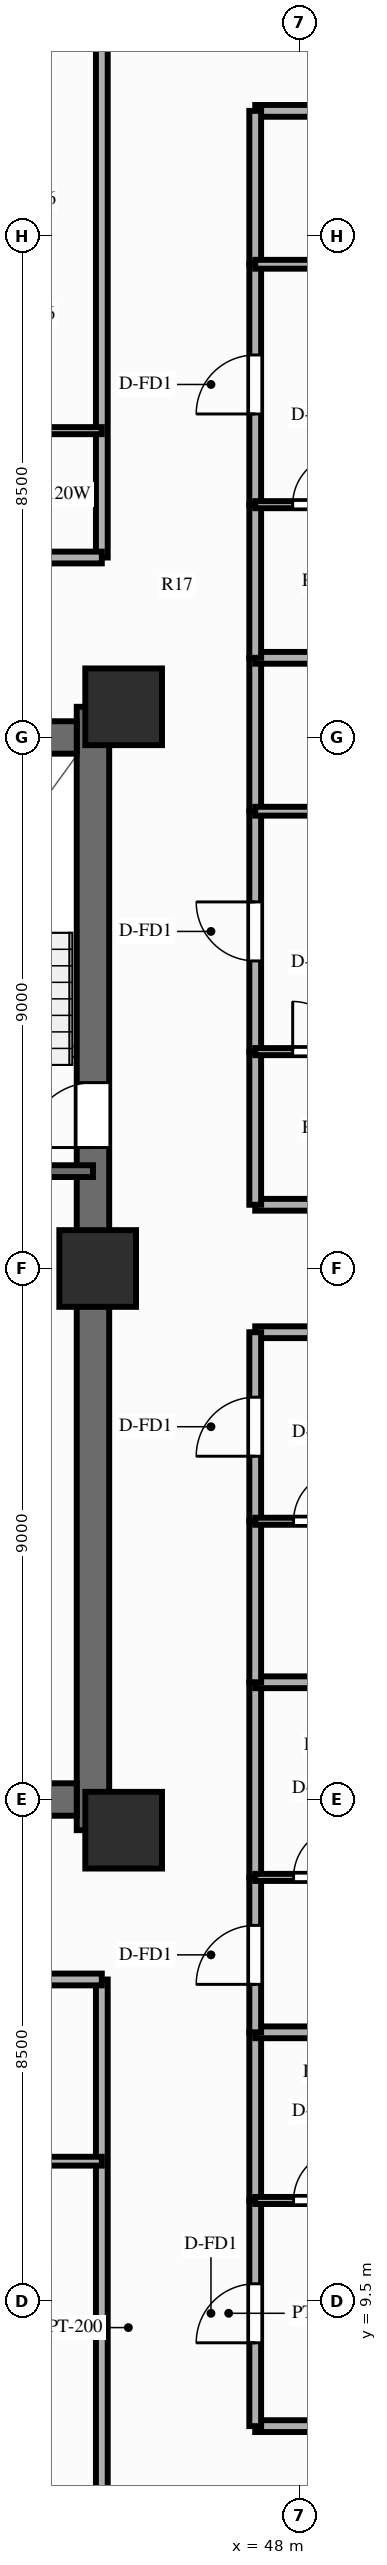
"""IFC4 building model, lengths in metres.
Left out: names, types, materials, properties, quantities, classifications, styles, units other than length and angle.
Written with IfcOpenShell. Run it as: python <this file> out.ifc"""

import sys

from ifc_helpers import new_model, si_unit, direction, frame, frame_2d, origin, origin_2d, place, context, subcontext, project, spatial, rectangle, extrude, source, transform, mapped, element, fill, save


model = new_model("IFC4")
c1 = context("Model", 3, precision=1e-05, world=origin(), true_north=direction((0.0, 1.0)))
c2 = subcontext(c1, "Body", "Model", "MODEL_VIEW")
j1 = project(units=[si_unit("LENGTHUNIT", "METRE"), si_unit("PLANEANGLEUNIT", "RADIAN")], contexts=[c1])
p1 = place(None, origin())
s1 = spatial("IfcSite", under=j1, at=p1, CompositionType="ELEMENT")
p2 = place(p1, origin())
s2 = spatial("IfcBuilding", under=s1, at=p2, CompositionType="ELEMENT")
p3 = place(p2, frame((0.0, 0.0, 119.85)))
s3 = spatial("IfcBuildingStorey", under=s2, at=p3, CompositionType="ELEMENT", Elevation=119.85)
p4 = place(p3, frame((44.5, 17.48, 0.0), z_axis=(0.0, 0.0, 1.0), x_axis=(0.0, 1.0, 0.0)))
e1 = element("IfcWall", 1, at=p4, inside=s3, PredefinedType="SHEAR", context=c2, shape_type="SweptSolid", body=[
    extrude(rectangle(XDim=19.04, YDim=0.55, at=frame_2d((9.52, 0.0))), origin(), (0.0, 0.0, 1.0), 3.0),
])
p5 = place(p4, frame((12.67, 0.0, 0.0), z_axis=(0.0, 0.0, 1.0), x_axis=(-1.0, 0.0, 0.0)))
e2 = element("IfcOpeningElement", 2, at=p5, cuts=e1, PredefinedType="OPENING", context=c2, shape_type="SweptSolid", body=[
    extrude(rectangle(XDim=1.1, YDim=2.15, at=frame_2d((0.55, 1.075))), frame((0.0, 0.287, 0.0), z_axis=(0.0, -1.0, 0.0), x_axis=(1.0, 0.0, 0.0)), (0.0, 0.0, 1.0), 0.574),
])
p6 = place(p3, frame((31.775, 18.0, 0.0), z_axis=(0.0, 0.0, 1.0), x_axis=(1.0, 0.0, 0.0)))
e3 = element("IfcWall", 3, at=p6, inside=s3, PredefinedType="SHEAR", context=c2, shape_type="SweptSolid", body=[
    extrude(rectangle(XDim=12.45, YDim=0.55, at=frame_2d((6.225, 0.0))), origin(), (0.0, 0.0, 1.0), 3.0),
])
p7 = place(p3, frame((31.775, 36.0, 0.0), z_axis=(0.0, 0.0, 1.0), x_axis=(1.0, 0.0, 0.0)))
e4 = element("IfcWall", 4, at=p7, inside=s3, PredefinedType="SHEAR", context=c2, shape_type="SweptSolid", body=[
    extrude(rectangle(XDim=12.45, YDim=0.55, at=frame_2d((6.225, 0.0))), origin(), (0.0, 0.0, 1.0), 3.0),
])
p8 = place(p7, frame((5.175, 0.0, 0.0), z_axis=(0.0, 0.0, 1.0), x_axis=(-1.0, 0.0, 0.0)))
e5 = element("IfcOpeningElement", 5, at=p8, cuts=e4, PredefinedType="OPENING", context=c2, shape_type="SweptSolid", body=[
    extrude(rectangle(XDim=1.4, YDim=2.15, at=frame_2d((0.7, 1.075))), frame((0.0, 0.287, 0.0), z_axis=(0.0, -1.0, 0.0), x_axis=(1.0, 0.0, 0.0)), (0.0, 0.0, 1.0), 0.574),
])
m1 = source(origin(), c2, "Body", "SweptSolid", [
    extrude(rectangle(XDim=1.3, YDim=1.3, at=origin_2d()), origin(), (0.0, 0.0, 1.0), 3.0),
])
for number, where, z_axis, x_axis in (
    (6, (45.02, 17.48, 0.0), (0.0, 0.0, 1.0), (1.0, 0.0, 0.0)),
    (7, (45.02, 36.52, 0.0), (0.0, 0.0, 1.0), (1.0, 0.0, 0.0)),
    (8, (44.58, 27.0, 0.0), (0.0, 0.0, 1.0), (1.0, 0.0, 0.0)),
):
    element("IfcColumn", number, at=place(p3, frame(where, z_axis=z_axis, x_axis=x_axis)), inside=s3, PredefinedType="COLUMN", context=c2, shape_type="MappedRepresentation", body=[
        mapped(m1, transform((0.0, 0.0, 0.0), scale=1.0)),
    ])
p9 = place(p3, frame((40.57, 28.65, 0.0), z_axis=(0.0, 0.0, 1.0), x_axis=(1.0, 0.0, 0.0)))
e9 = element("IfcWall", 9, at=p9, inside=s3, PredefinedType="SOLIDWALL", context=c2, shape_type="SweptSolid", body=[
    extrude(rectangle(XDim=3.93, YDim=0.2, at=frame_2d((1.965, 0.0))), origin(), (0.0, 0.0, 1.0), 2.79),
])
p10 = place(p3, frame((44.65, 14.95, 0.0), z_axis=(0.0, 0.0, 1.0), x_axis=(0.0, -1.0, 0.0)))
e10 = element("IfcWall", 10, at=p10, inside=s3, PredefinedType="PARTITIONING", context=c2, shape_type="SweptSolid", body=[
    extrude(rectangle(XDim=11.8, YDim=0.2, at=frame_2d((5.9, 0.0))), origin(), (0.0, 0.0, 1.0), 2.34),
])
p11 = place(p3, frame((40.923, 14.95, 0.0), z_axis=(0.0, 0.0, 1.0), x_axis=(1.0, 0.0, 0.0)))
e11 = element("IfcWall", 11, at=p11, inside=s3, PredefinedType="PARTITIONING", context=c2, shape_type="SweptSolid", body=[
    extrude(rectangle(XDim=3.727, YDim=0.2, at=frame_2d((1.864, 0.0))), origin(), (0.0, 0.0, 1.0), 2.79),
])
p12 = place(p3, frame((40.923, 11.87, 0.0), z_axis=(0.0, 0.0, 1.0), x_axis=(1.0, 0.0, 0.0)))
e12 = element("IfcWall", 12, at=p12, inside=s3, PredefinedType="PARTITIONING", context=c2, shape_type="SweptSolid", body=[
    extrude(rectangle(XDim=3.727, YDim=0.15, at=frame_2d((1.864, 0.0))), origin(), (0.0, 0.0, 1.0), 2.79),
])
p13 = place(p3, frame((44.65, 39.05, 0.0), z_axis=(0.0, 0.0, 1.0), x_axis=(0.0, 1.0, 0.0)))
e13 = element("IfcWall", 13, at=p13, inside=s3, PredefinedType="PARTITIONING", context=c2, shape_type="SweptSolid", body=[
    extrude(rectangle(XDim=11.8, YDim=0.2, at=frame_2d((5.9, 0.0))), origin(), (0.0, 0.0, 1.0), 2.34),
])
p14 = place(p3, frame((42.55, 39.05, 0.0), z_axis=(0.0, 0.0, 1.0), x_axis=(1.0, 0.0, 0.0)))
e14 = element("IfcWall", 14, at=p14, inside=s3, PredefinedType="PARTITIONING", context=c2, shape_type="SweptSolid", body=[
    extrude(rectangle(XDim=2.1, YDim=0.2, at=frame_2d((1.05, 0.0))), origin(), (0.0, 0.0, 1.0), 2.79),
])
p15 = place(p3, frame((42.55, 41.2, 0.0), z_axis=(0.0, 0.0, 1.0), x_axis=(1.0, 0.0, 0.0)))
e15 = element("IfcWall", 15, at=p15, inside=s3, PredefinedType="PARTITIONING", context=c2, shape_type="SweptSolid", body=[
    extrude(rectangle(XDim=2.1, YDim=0.12, at=frame_2d((1.05, 0.0))), origin(), (0.0, 0.0, 1.0), 2.79),
])
for number, where, z_axis, x_axis in (
    (16, (47.25, 7.38, 0.0), (0.0, 0.0, 1.0), (1.0, 0.0, 0.0)),
    (17, (47.25, 25.92, 0.0), (0.0, 0.0, 1.0), (1.0, 0.0, 0.0)),
):
    element("IfcWall", number, at=place(p3, frame(where, z_axis=z_axis, x_axis=x_axis)), inside=s3, PredefinedType="PARTITIONING", context=c2, shape_type="SweptSolid", body=[
        extrude(rectangle(XDim=16.6, YDim=0.2, at=frame_2d((8.3, 0.0))), origin(), (0.0, 0.0, 1.0), 2.79),
    ])
p16 = place(p3, frame((47.25, 7.38, 0.0), z_axis=(0.0, 0.0, 1.0), x_axis=(0.0, 1.0, 0.0)))
e18 = element("IfcWall", 18, at=p16, inside=s3, PredefinedType="PARTITIONING", context=c2, shape_type="SweptSolid", body=[
    extrude(rectangle(XDim=3.824, YDim=0.2, at=frame_2d((1.912, 0.0))), origin(), (0.0, 0.0, 1.0), 2.79),
])
p17 = place(p16, frame((1.412, 0.0, 0.0)))
e19 = element("IfcOpeningElement", 19, at=p17, cuts=e18, PredefinedType="OPENING", context=c2, shape_type="SweptSolid", body=[
    extrude(rectangle(XDim=1.0, YDim=2.15, at=frame_2d((0.5, 1.075))), frame((0.0, 0.112, 0.0), z_axis=(0.0, -1.0, 0.0), x_axis=(1.0, 0.0, 0.0)), (0.0, 0.0, 1.0), 0.224),
])
p18 = place(p3, frame((47.25, 11.204, 0.0), z_axis=(0.0, 0.0, 1.0), x_axis=(0.0, 1.0, 0.0)))
e20 = element("IfcWall", 20, at=p18, inside=s3, PredefinedType="PARTITIONING", context=c2, shape_type="SweptSolid", body=[
    extrude(rectangle(XDim=2.85, YDim=0.2, at=frame_2d((1.425, 0.0))), origin(), (0.0, 0.0, 1.0), 2.79),
])
p19 = place(p3, frame((47.25, 11.204, 0.0), z_axis=(0.0, 0.0, 1.0), x_axis=(1.0, 0.0, 0.0)))
e21 = element("IfcWall", 21, at=p19, inside=s3, PredefinedType="PARTITIONING", context=c2, shape_type="SweptSolid", body=[
    extrude(rectangle(XDim=2.15, YDim=0.12, at=frame_2d((1.075, 0.0))), origin(), (0.0, 0.0, 1.0), 2.79),
])
p20 = place(p19, frame((0.65, 0.0, 0.0)))
e22 = element("IfcOpeningElement", 22, at=p20, cuts=e21, PredefinedType="OPENING", context=c2, shape_type="SweptSolid", body=[
    extrude(rectangle(XDim=0.85, YDim=2.05, at=frame_2d((0.425, 1.025))), frame((0.0, 0.072, 0.0), z_axis=(0.0, -1.0, 0.0), x_axis=(1.0, 0.0, 0.0)), (0.0, 0.0, 1.0), 0.144),
])
p21 = place(p3, frame((47.25, 14.054, 0.0), z_axis=(0.0, 0.0, 1.0), x_axis=(1.0, 0.0, 0.0)))
e23 = element("IfcWall", 23, at=p21, inside=s3, PredefinedType="PARTITIONING", context=c2, shape_type="SweptSolid", body=[
    extrude(rectangle(XDim=16.6, YDim=0.2, at=frame_2d((8.3, 0.0))), origin(), (0.0, 0.0, 1.0), 2.79),
])
p22 = place(p3, frame((47.25, 14.054, 0.0), z_axis=(0.0, 0.0, 1.0), x_axis=(0.0, 1.0, 0.0)))
e24 = element("IfcWall", 24, at=p22, inside=s3, PredefinedType="PARTITIONING", context=c2, shape_type="SweptSolid", body=[
    extrude(rectangle(XDim=2.625, YDim=0.2, at=frame_2d((1.313, 0.0))), origin(), (0.0, 0.0, 1.0), 2.79),
])
p23 = place(p22, frame((0.813, 0.0, 0.0)))
e25 = element("IfcOpeningElement", 25, at=p23, cuts=e24, PredefinedType="OPENING", context=c2, shape_type="SweptSolid", body=[
    extrude(rectangle(XDim=1.0, YDim=2.15, at=frame_2d((0.5, 1.075))), frame((0.0, 0.112, 0.0), z_axis=(0.0, -1.0, 0.0), x_axis=(1.0, 0.0, 0.0)), (0.0, 0.0, 1.0), 0.224),
])
p24 = place(p3, frame((47.25, 16.68, 0.0), z_axis=(0.0, 0.0, 1.0), x_axis=(0.0, 1.0, 0.0)))
e26 = element("IfcWall", 26, at=p24, inside=s3, PredefinedType="PARTITIONING", context=c2, shape_type="SweptSolid", body=[
    extrude(rectangle(XDim=3.307, YDim=0.2, at=frame_2d((1.654, 0.0))), origin(), (0.0, 0.0, 1.0), 2.79),
])
p25 = place(p3, frame((47.25, 16.68, 0.0), z_axis=(0.0, 0.0, 1.0), x_axis=(1.0, 0.0, 0.0)))
e27 = element("IfcWall", 27, at=p25, inside=s3, PredefinedType="PARTITIONING", context=c2, shape_type="SweptSolid", body=[
    extrude(rectangle(XDim=2.15, YDim=0.12, at=frame_2d((1.075, 0.0))), origin(), (0.0, 0.0, 1.0), 2.79),
])
p26 = place(p25, frame((0.65, 0.0, 0.0)))
e28 = element("IfcOpeningElement", 28, at=p26, cuts=e27, PredefinedType="OPENING", context=c2, shape_type="SweptSolid", body=[
    extrude(rectangle(XDim=0.85, YDim=2.05, at=frame_2d((0.425, 1.025))), frame((0.0, 0.072, 0.0), z_axis=(0.0, -1.0, 0.0), x_axis=(1.0, 0.0, 0.0)), (0.0, 0.0, 1.0), 0.144),
])
p27 = place(p3, frame((47.25, 19.987, 0.0), z_axis=(0.0, 0.0, 1.0), x_axis=(1.0, 0.0, 0.0)))
e29 = element("IfcWall", 29, at=p27, inside=s3, PredefinedType="PARTITIONING", context=c2, shape_type="SweptSolid", body=[
    extrude(rectangle(XDim=16.6, YDim=0.2, at=frame_2d((8.3, 0.0))), origin(), (0.0, 0.0, 1.0), 2.79),
])
p28 = place(p3, frame((47.25, 19.987, 0.0), z_axis=(0.0, 0.0, 1.0), x_axis=(0.0, 1.0, 0.0)))
e30 = element("IfcWall", 30, at=p28, inside=s3, PredefinedType="PARTITIONING", context=c2, shape_type="SweptSolid", body=[
    extrude(rectangle(XDim=2.729, YDim=0.2, at=frame_2d((1.365, 0.0))), origin(), (0.0, 0.0, 1.0), 2.79),
])
p29 = place(p3, frame((47.25, 22.716, 0.0), z_axis=(0.0, 0.0, 1.0), x_axis=(0.0, 1.0, 0.0)))
e31 = element("IfcWall", 31, at=p29, inside=s3, PredefinedType="PARTITIONING", context=c2, shape_type="SweptSolid", body=[
    extrude(rectangle(XDim=3.204, YDim=0.2, at=frame_2d((1.602, 0.0))), origin(), (0.0, 0.0, 1.0), 2.79),
])
p30 = place(p29, frame((1.102, 0.0, 0.0)))
e32 = element("IfcOpeningElement", 32, at=p30, cuts=e31, PredefinedType="OPENING", context=c2, shape_type="SweptSolid", body=[
    extrude(rectangle(XDim=1.0, YDim=2.15, at=frame_2d((0.5, 1.075))), frame((0.0, 0.112, 0.0), z_axis=(0.0, -1.0, 0.0), x_axis=(1.0, 0.0, 0.0)), (0.0, 0.0, 1.0), 0.224),
])
p31 = place(p3, frame((47.25, 22.716, 0.0), z_axis=(0.0, 0.0, 1.0), x_axis=(1.0, 0.0, 0.0)))
e33 = element("IfcWall", 33, at=p31, inside=s3, PredefinedType="PARTITIONING", context=c2, shape_type="SweptSolid", body=[
    extrude(rectangle(XDim=2.15, YDim=0.12, at=frame_2d((1.075, 0.0))), origin(), (0.0, 0.0, 1.0), 2.79),
])
p32 = place(p31, frame((0.65, 0.0, 0.0)))
e34 = element("IfcOpeningElement", 34, at=p32, cuts=e33, PredefinedType="OPENING", context=c2, shape_type="SweptSolid", body=[
    extrude(rectangle(XDim=0.85, YDim=2.05, at=frame_2d((0.425, 1.025))), frame((0.0, 0.072, 0.0), z_axis=(0.0, -1.0, 0.0), x_axis=(1.0, 0.0, 0.0)), (0.0, 0.0, 1.0), 0.144),
])
for number, where, z_axis, x_axis in (
    (35, (47.25, 28.08, 0.0), (0.0, 0.0, 1.0), (1.0, 0.0, 0.0)),
    (36, (47.25, 46.62, 0.0), (0.0, 0.0, 1.0), (1.0, 0.0, 0.0)),
):
    element("IfcWall", number, at=place(p3, frame(where, z_axis=z_axis, x_axis=x_axis)), inside=s3, PredefinedType="PARTITIONING", context=c2, shape_type="SweptSolid", body=[
        extrude(rectangle(XDim=16.6, YDim=0.2, at=frame_2d((8.3, 0.0))), origin(), (0.0, 0.0, 1.0), 2.79),
    ])
p33 = place(p3, frame((47.25, 28.08, 0.0), z_axis=(0.0, 0.0, 1.0), x_axis=(0.0, 1.0, 0.0)))
e37 = element("IfcWall", 37, at=p33, inside=s3, PredefinedType="PARTITIONING", context=c2, shape_type="SweptSolid", body=[
    extrude(rectangle(XDim=2.595, YDim=0.2, at=frame_2d((1.298, 0.0))), origin(), (0.0, 0.0, 1.0), 2.79),
])
p34 = place(p3, frame((47.25, 30.676, 0.0), z_axis=(0.0, 0.0, 1.0), x_axis=(0.0, 1.0, 0.0)))
e38 = element("IfcWall", 38, at=p34, inside=s3, PredefinedType="PARTITIONING", context=c2, shape_type="SweptSolid", body=[
    extrude(rectangle(XDim=4.074, YDim=0.2, at=frame_2d((2.037, 0.0))), origin(), (0.0, 0.0, 1.0), 2.79),
])
p35 = place(p34, frame((1.537, 0.0, 0.0)))
e39 = element("IfcOpeningElement", 39, at=p35, cuts=e38, PredefinedType="OPENING", context=c2, shape_type="SweptSolid", body=[
    extrude(rectangle(XDim=1.0, YDim=2.15, at=frame_2d((0.5, 1.075))), frame((0.0, 0.112, 0.0), z_axis=(0.0, -1.0, 0.0), x_axis=(1.0, 0.0, 0.0)), (0.0, 0.0, 1.0), 0.224),
])
p36 = place(p3, frame((47.25, 34.75, 0.0), z_axis=(0.0, 0.0, 1.0), x_axis=(0.0, 1.0, 0.0)))
e40 = element("IfcWall", 40, at=p36, inside=s3, PredefinedType="PARTITIONING", context=c2, shape_type="SweptSolid", body=[
    extrude(rectangle(XDim=2.6, YDim=0.2, at=frame_2d((1.3, 0.0))), origin(), (0.0, 0.0, 1.0), 2.79),
])
p37 = place(p3, frame((47.25, 30.676, 0.0), z_axis=(0.0, 0.0, 1.0), x_axis=(1.0, 0.0, 0.0)))
e41 = element("IfcWall", 41, at=p37, inside=s3, PredefinedType="PARTITIONING", context=c2, shape_type="SweptSolid", body=[
    extrude(rectangle(XDim=2.12, YDim=0.12, at=frame_2d((1.06, 0.0))), origin(), (0.0, 0.0, 1.0), 2.79),
])
p38 = place(p37, frame((0.635, 0.0, 0.0)))
e42 = element("IfcOpeningElement", 42, at=p38, cuts=e41, PredefinedType="OPENING", context=c2, shape_type="SweptSolid", body=[
    extrude(rectangle(XDim=0.85, YDim=2.05, at=frame_2d((0.425, 1.025))), frame((0.0, 0.072, 0.0), z_axis=(0.0, -1.0, 0.0), x_axis=(1.0, 0.0, 0.0)), (0.0, 0.0, 1.0), 0.144),
])
p39 = place(p3, frame((47.25, 34.75, 0.0), z_axis=(0.0, 0.0, 1.0), x_axis=(1.0, 0.0, 0.0)))
e43 = element("IfcWall", 43, at=p39, inside=s3, PredefinedType="PARTITIONING", context=c2, shape_type="SweptSolid", body=[
    extrude(rectangle(XDim=3.08, YDim=0.15, at=frame_2d((1.54, 0.0))), origin(), (0.0, 0.0, 1.0), 2.79),
])
p40 = place(p39, frame((1.09, 0.0, 0.0)))
e44 = element("IfcOpeningElement", 44, at=p40, cuts=e43, PredefinedType="OPENING", context=c2, shape_type="SweptSolid", body=[
    extrude(rectangle(XDim=0.9, YDim=2.1, at=frame_2d((0.45, 1.05))), frame((0.0, 0.087, 0.0), z_axis=(0.0, -1.0, 0.0), x_axis=(1.0, 0.0, 0.0)), (0.0, 0.0, 1.0), 0.174),
])
p41 = place(p3, frame((47.25, 37.35, 0.0), z_axis=(0.0, 0.0, 1.0), x_axis=(1.0, 0.0, 0.0)))
e45 = element("IfcWall", 45, at=p41, inside=s3, PredefinedType="PARTITIONING", context=c2, shape_type="SweptSolid", body=[
    extrude(rectangle(XDim=16.6, YDim=0.2, at=frame_2d((8.3, 0.0))), origin(), (0.0, 0.0, 1.0), 2.79),
])
p42 = place(p3, frame((47.25, 37.35, 0.0), z_axis=(0.0, 0.0, 1.0), x_axis=(0.0, 1.0, 0.0)))
e46 = element("IfcWall", 46, at=p42, inside=s3, PredefinedType="PARTITIONING", context=c2, shape_type="SweptSolid", body=[
    extrude(rectangle(XDim=2.595, YDim=0.2, at=frame_2d((1.298, 0.0))), origin(), (0.0, 0.0, 1.0), 2.79),
])
p43 = place(p3, frame((47.25, 39.946, 0.0), z_axis=(0.0, 0.0, 1.0), x_axis=(0.0, 1.0, 0.0)))
e47 = element("IfcWall", 47, at=p43, inside=s3, PredefinedType="PARTITIONING", context=c2, shape_type="SweptSolid", body=[
    extrude(rectangle(XDim=4.074, YDim=0.2, at=frame_2d((2.037, 0.0))), origin(), (0.0, 0.0, 1.0), 2.79),
])
p44 = place(p43, frame((1.537, 0.0, 0.0)))
e48 = element("IfcOpeningElement", 48, at=p44, cuts=e47, PredefinedType="OPENING", context=c2, shape_type="SweptSolid", body=[
    extrude(rectangle(XDim=1.0, YDim=2.15, at=frame_2d((0.5, 1.075))), frame((0.0, 0.112, 0.0), z_axis=(0.0, -1.0, 0.0), x_axis=(1.0, 0.0, 0.0)), (0.0, 0.0, 1.0), 0.224),
])
p45 = place(p3, frame((47.25, 44.02, 0.0), z_axis=(0.0, 0.0, 1.0), x_axis=(0.0, 1.0, 0.0)))
e49 = element("IfcWall", 49, at=p45, inside=s3, PredefinedType="PARTITIONING", context=c2, shape_type="SweptSolid", body=[
    extrude(rectangle(XDim=2.6, YDim=0.2, at=frame_2d((1.3, 0.0))), origin(), (0.0, 0.0, 1.0), 2.79),
])
p46 = place(p3, frame((47.25, 39.946, 0.0), z_axis=(0.0, 0.0, 1.0), x_axis=(1.0, 0.0, 0.0)))
e50 = element("IfcWall", 50, at=p46, inside=s3, PredefinedType="PARTITIONING", context=c2, shape_type="SweptSolid", body=[
    extrude(rectangle(XDim=2.12, YDim=0.12, at=frame_2d((1.06, 0.0))), origin(), (0.0, 0.0, 1.0), 2.79),
])
p47 = place(p46, frame((0.635, 0.0, 0.0)))
e51 = element("IfcOpeningElement", 51, at=p47, cuts=e50, PredefinedType="OPENING", context=c2, shape_type="SweptSolid", body=[
    extrude(rectangle(XDim=0.85, YDim=2.05, at=frame_2d((0.425, 1.025))), frame((0.0, 0.072, 0.0), z_axis=(0.0, -1.0, 0.0), x_axis=(1.0, 0.0, 0.0)), (0.0, 0.0, 1.0), 0.144),
])
p48 = place(p3, frame((47.25, 44.02, 0.0), z_axis=(0.0, 0.0, 1.0), x_axis=(1.0, 0.0, 0.0)))
e52 = element("IfcWall", 52, at=p48, inside=s3, PredefinedType="PARTITIONING", context=c2, shape_type="SweptSolid", body=[
    extrude(rectangle(XDim=3.08, YDim=0.15, at=frame_2d((1.54, 0.0))), origin(), (0.0, 0.0, 1.0), 2.79),
])
p49 = place(p48, frame((1.09, 0.0, 0.0)))
e53 = element("IfcOpeningElement", 53, at=p49, cuts=e52, PredefinedType="OPENING", context=c2, shape_type="SweptSolid", body=[
    extrude(rectangle(XDim=0.9, YDim=2.1, at=frame_2d((0.45, 1.05))), frame((0.0, 0.087, 0.0), z_axis=(0.0, -1.0, 0.0), x_axis=(1.0, 0.0, 0.0)), (0.0, 0.0, 1.0), 0.174),
])
m2 = source(origin(), c2, "Body", "SweptSolid", [
    extrude(rectangle(XDim=1.1, YDim=2.15, at=frame_2d((0.55, 1.075))), frame((0.0, 0.025, 0.0), z_axis=(0.0, -1.0, 0.0), x_axis=(1.0, 0.0, 0.0)), (0.0, 0.0, 1.0), 0.05),
])
p50 = place(p5, origin())
e54 = element("IfcDoor", 54, at=p50, inside=s3, OperationType="SINGLE_SWING_RIGHT", PredefinedType="DOOR", context=c2, shape_type="MappedRepresentation", body=[
    mapped(m2, transform((0.0, 0.0, 0.0), scale=1.0)),
])
fill(e2, e54)
m3 = source(origin(), c2, "Body", "SweptSolid", [
    extrude(rectangle(XDim=1.0, YDim=2.15, at=frame_2d((0.5, 1.075))), frame((0.0, 0.025, 0.0), z_axis=(0.0, -1.0, 0.0), x_axis=(1.0, 0.0, 0.0)), (0.0, 0.0, 1.0), 0.05),
])
p51 = place(p17, origin())
e55 = element("IfcDoor", 55, at=p51, inside=s3, OperationType="SINGLE_SWING_LEFT", PredefinedType="DOOR", context=c2, shape_type="MappedRepresentation", body=[
    mapped(m3, transform((0.0, 0.0, 0.0), scale=1.0)),
])
fill(e19, e55)
m4 = source(origin(), c2, "Body", "SweptSolid", [
    extrude(rectangle(XDim=0.85, YDim=2.05, at=frame_2d((0.425, 1.025))), frame((0.0, 0.025, 0.0), z_axis=(0.0, -1.0, 0.0), x_axis=(1.0, 0.0, 0.0)), (0.0, 0.0, 1.0), 0.05),
])
p52 = place(p20, origin())
e56 = element("IfcDoor", 56, at=p52, inside=s3, OperationType="SINGLE_SWING_RIGHT", PredefinedType="DOOR", context=c2, shape_type="MappedRepresentation", body=[
    mapped(m4, transform((0.0, 0.0, 0.0), scale=1.0)),
])
fill(e22, e56)
p53 = place(p23, origin())
e57 = element("IfcDoor", 57, at=p53, inside=s3, OperationType="SINGLE_SWING_LEFT", PredefinedType="DOOR", context=c2, shape_type="MappedRepresentation", body=[
    mapped(m3, transform((0.0, 0.0, 0.0), scale=1.0)),
])
fill(e25, e57)
p54 = place(p26, origin())
e58 = element("IfcDoor", 58, at=p54, inside=s3, OperationType="SINGLE_SWING_RIGHT", PredefinedType="DOOR", context=c2, shape_type="MappedRepresentation", body=[
    mapped(m4, transform((0.0, 0.0, 0.0), scale=1.0)),
])
fill(e28, e58)
p55 = place(p30, origin())
e59 = element("IfcDoor", 59, at=p55, inside=s3, OperationType="SINGLE_SWING_LEFT", PredefinedType="DOOR", context=c2, shape_type="MappedRepresentation", body=[
    mapped(m3, transform((0.0, 0.0, 0.0), scale=1.0)),
])
fill(e32, e59)
p56 = place(p32, origin())
e60 = element("IfcDoor", 60, at=p56, inside=s3, OperationType="SINGLE_SWING_RIGHT", PredefinedType="DOOR", context=c2, shape_type="MappedRepresentation", body=[
    mapped(m4, transform((0.0, 0.0, 0.0), scale=1.0)),
])
fill(e34, e60)
p57 = place(p35, origin())
e61 = element("IfcDoor", 61, at=p57, inside=s3, OperationType="SINGLE_SWING_RIGHT", PredefinedType="DOOR", context=c2, shape_type="MappedRepresentation", body=[
    mapped(m3, transform((0.0, 0.0, 0.0), scale=1.0)),
])
fill(e39, e61)
p58 = place(p38, origin())
e62 = element("IfcDoor", 62, at=p58, inside=s3, OperationType="SINGLE_SWING_LEFT", PredefinedType="DOOR", context=c2, shape_type="MappedRepresentation", body=[
    mapped(m4, transform((0.0, 0.0, 0.0), scale=1.0)),
])
fill(e42, e62)
p59 = place(p44, origin())
e63 = element("IfcDoor", 63, at=p59, inside=s3, OperationType="SINGLE_SWING_LEFT", PredefinedType="DOOR", context=c2, shape_type="MappedRepresentation", body=[
    mapped(m3, transform((0.0, 0.0, 0.0), scale=1.0)),
])
fill(e48, e63)
p60 = place(p47, origin())
e64 = element("IfcDoor", 64, at=p60, inside=s3, OperationType="SINGLE_SWING_RIGHT", PredefinedType="DOOR", context=c2, shape_type="MappedRepresentation", body=[
    mapped(m4, transform((0.0, 0.0, 0.0), scale=1.0)),
])
fill(e51, e64)
save(model, sys.argv[1])
